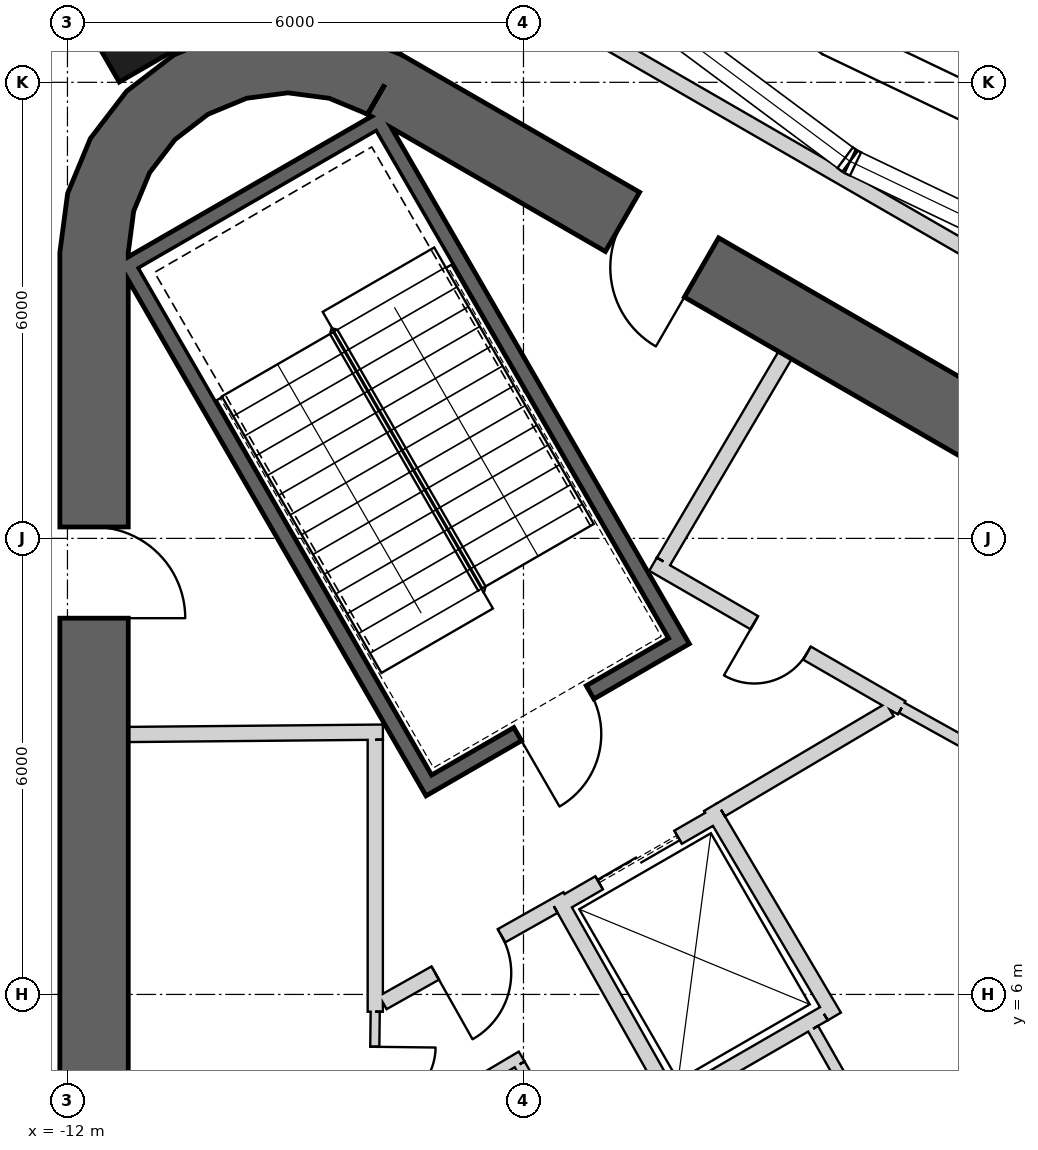
"""IFC4 building model, lengths in metres.
Left out: names, types, materials, properties, quantities, classifications, styles, units other than length and angle.
Written with IfcOpenShell. Run it as: python <this file> out.ifc"""

import sys

from ifc_helpers import new_model, si_unit, direction, frame, frame_2d, origin, origin_2d, place, context, subcontext, project, spatial, polyline, rectangle, outline, extrude, element, fill, save


model = new_model("IFC4")
c1 = context("Model", 3, precision=1e-05, world=origin(), true_north=direction((0.0, 1.0)))
c2 = subcontext(c1, "Body", "Model", "MODEL_VIEW")
j1 = project(units=[si_unit("LENGTHUNIT", "METRE"), si_unit("PLANEANGLEUNIT", "RADIAN")], contexts=[c1])
p1 = place(None, origin())
s1 = spatial("IfcSite", under=j1, at=p1, CompositionType="ELEMENT")
p2 = place(p1, origin())
s2 = spatial("IfcBuilding", under=s1, at=p2, CompositionType="ELEMENT")
p3 = place(p2, frame((0.0, 0.0, 435.3)))
s3 = spatial("IfcBuildingStorey", under=s2, at=p3, CompositionType="ELEMENT", Elevation=435.3)
p4 = place(p3, frame((-11.025, 19.097, 0.0), z_axis=(0.0, 0.0, 1.0), x_axis=(-0.5, 0.866025403784, 0.0)))
e1 = element("IfcColumn", 1, at=p4, inside=s3, PredefinedType="COLUMN", context=c2, shape_type="SweptSolid", body=[
    extrude(rectangle(XDim=1.6, YDim=1.6, at=origin_2d()), origin(), (0.0, 0.0, 1.0), 5.0),
])
p5 = place(p3, frame((19.475, 2.208, 0.0), z_axis=(0.0, 0.0, 1.0), x_axis=(-0.866028369851, 0.499994862586, 0.0)))
e2 = element("IfcWall", 2, at=p5, inside=s3, PredefinedType="SHEAR", context=c2, shape_type="SweptSolid", body=[
    extrude(rectangle(XDim=31.523, YDim=0.9, at=frame_2d((15.762, 0.0))), origin(), (0.0, 0.0, 1.0), 5.0),
])
p6 = place(p5, frame((3.612, 0.0, 0.0)))
e3 = element("IfcOpeningElement", 3, at=p6, cuts=e2, PredefinedType="OPENING", context=c2, shape_type="SweptSolid", body=[
    extrude(rectangle(XDim=1.2, YDim=2.4, at=frame_2d((0.6, 1.2))), frame((0.0, 0.46, 0.0), z_axis=(0.0, -1.0, 0.0), x_axis=(1.0, 0.0, 0.0)), (0.0, 0.0, 1.0), 0.92),
])
p7 = place(p5, frame((26.712, 0.0, 0.0)))
e4 = element("IfcOpeningElement", 4, at=p7, cuts=e2, PredefinedType="OPENING", context=c2, shape_type="SweptSolid", body=[
    extrude(rectangle(XDim=1.2, YDim=2.4, at=frame_2d((0.6, 1.2))), frame((0.0, 0.46, 0.0), z_axis=(0.0, -1.0, 0.0), x_axis=(1.0, 0.0, 0.0)), (0.0, 0.0, 1.0), 0.92),
])
p8 = place(p3, frame((-11.65, 15.762, 0.0), z_axis=(0.0, 0.0, 1.0), x_axis=(0.0, -1.0, 0.0)))
e5 = element("IfcWall", 5, at=p8, inside=s3, PredefinedType="SHEAR", context=c2, shape_type="SweptSolid", body=[
    extrude(rectangle(XDim=31.523, YDim=0.9, at=frame_2d((15.762, 0.0))), origin(), (0.0, 0.0, 1.0), 5.0),
])
p9 = place(p8, frame((3.612, 0.0, 0.0)))
e6 = element("IfcOpeningElement", 6, at=p9, cuts=e5, PredefinedType="OPENING", context=c2, shape_type="SweptSolid", body=[
    extrude(rectangle(XDim=1.2, YDim=2.4, at=frame_2d((0.6, 1.2))), frame((0.0, 0.46, 0.0), z_axis=(0.0, -1.0, 0.0), x_axis=(1.0, 0.0, 0.0)), (0.0, 0.0, 1.0), 0.92),
])
p10 = place(p8, frame((26.712, 0.0, 0.0)))
e7 = element("IfcOpeningElement", 7, at=p10, cuts=e5, PredefinedType="OPENING", context=c2, shape_type="SweptSolid", body=[
    extrude(rectangle(XDim=1.2, YDim=2.4, at=frame_2d((0.6, 1.2))), frame((0.0, 0.46, 0.0), z_axis=(0.0, -1.0, 0.0), x_axis=(1.0, 0.0, 0.0)), (0.0, 0.0, 1.0), 0.92),
])
p11 = place(p3, origin())
e8 = element("IfcWall", 8, at=p11, inside=s3, PredefinedType="SHEAR", context=c2, shape_type="SweptSolid", body=[
    extrude(outline(polyline([(-7.6, 18.36), (-8.323, 18.659), (-9.1, 18.762), (-9.876, 18.659), (-10.6, 18.36), (-11.221, 17.883), (-11.698, 17.262), (-11.998, 16.538), (-12.1, 15.762), (-11.2, 15.762), (-11.128, 16.305), (-10.919, 16.812), (-10.585, 17.247), (-10.15, 17.58), (-9.644, 17.79), (-9.1, 17.862), (-8.556, 17.79), (-8.05, 17.58), (-7.6, 18.36)])), origin(), (0.0, 0.0, 1.0), 5.0),
])
p12 = place(p3, frame((-11.245, 15.678, -0.25), z_axis=(0.0, 0.0, 1.0), x_axis=(0.499977274689, -0.866038523851, 0.0)))
e9 = element("IfcWall", 9, at=p12, inside=s3, PredefinedType="SHEAR", context=c2, shape_type="SweptSolid", body=[
    extrude(rectangle(XDim=8.1, YDim=0.2, at=frame_2d((4.05, 0.0))), origin(), (0.0, 0.0, 1.0), 5.0),
])
p13 = place(p3, frame((-7.818, 17.541, -0.25), z_axis=(0.0, 0.0, 1.0), x_axis=(-0.866044365799, -0.499967155389, 0.0)))
e10 = element("IfcWall", 10, at=p13, inside=s3, PredefinedType="SHEAR", context=c2, shape_type="SweptSolid", body=[
    extrude(rectangle(XDim=3.8, YDim=0.2, at=frame_2d((1.9, 0.0))), origin(), (0.0, 0.0, 1.0), 5.0),
])
p14 = place(p3, frame((-7.854, 17.405, -0.25), z_axis=(0.0, 0.0, 1.0), x_axis=(0.499997992926, -0.866026562566, 0.0)))
e11 = element("IfcWall", 11, at=p14, inside=s3, PredefinedType="SHEAR", context=c2, shape_type="SweptSolid", body=[
    extrude(rectangle(XDim=7.9, YDim=0.2, at=frame_2d((3.95, 0.0))), origin(), (0.0, 0.0, 1.0), 5.0),
])
p15 = place(p3, frame((-7.159, 8.8, -0.25), z_axis=(0.0, 0.0, 1.0), x_axis=(0.866047807691, 0.499961193289, 0.0)))
e12 = element("IfcWall", 12, at=p15, inside=s3, PredefinedType="SHEAR", context=c2, shape_type="SweptSolid", body=[
    extrude(rectangle(XDim=3.6, YDim=0.2, at=frame_2d((1.8, 0.0))), origin(), (0.0, 0.0, 1.0), 5.0),
])
p16 = place(p15, frame((1.25, 0.0, 0.25)))
e13 = element("IfcOpeningElement", 13, at=p16, cuts=e12, PredefinedType="OPENING", context=c2, shape_type="SweptSolid", body=[
    extrude(rectangle(XDim=1.1, YDim=2.1, at=frame_2d((0.55, 1.05))), frame((0.0, 0.11, 0.0), z_axis=(0.0, -1.0, 0.0), x_axis=(1.0, 0.0, 0.0)), (0.0, 0.0, 1.0), 0.22),
])
p17 = place(p3, frame((-5.524, 7.168, 0.0), z_axis=(0.0, 0.0, 1.0), x_axis=(0.866024647952, 0.500001309137, 0.0)))
e14 = element("IfcWall", 14, at=p17, inside=s3, PredefinedType="PLUMBINGWALL", context=c2, shape_type="SweptSolid", body=[
    extrude(rectangle(XDim=2.4, YDim=0.2, at=frame_2d((1.2, 0.0))), origin(), (0.0, 0.0, 1.0), 4.75),
])
p18 = place(p17, frame((0.6, 0.0, 0.0)))
e15 = element("IfcOpeningElement", 15, at=p18, cuts=e14, PredefinedType="OPENING", context=c2, shape_type="SweptSolid", body=[
    extrude(rectangle(XDim=1.2, YDim=2.4, at=frame_2d((0.6, 1.2))), frame((0.0, 0.11, 0.0), z_axis=(0.0, -1.0, 0.0), x_axis=(1.0, 0.0, 0.0)), (0.0, 0.0, 1.0), 0.22),
])
p19 = place(p3, frame((-3.538, 8.465, 0.0), z_axis=(0.0, 0.0, 1.0), x_axis=(0.508616218331, -0.860993346345, 0.0)))
e16 = element("IfcWall", 16, at=p19, inside=s3, PredefinedType="PLUMBINGWALL", context=c2, shape_type="SweptSolid", body=[
    extrude(rectangle(XDim=3.2, YDim=0.2, at=frame_2d((1.6, 0.0))), origin(), (0.0, 0.0, 1.0), 4.75),
])
p20 = place(p3, frame((-2.047, 5.746, 0.0), z_axis=(0.0, 0.0, 1.0), x_axis=(-0.866024647952, -0.500001309137, 0.0)))
e17 = element("IfcWall", 17, at=p20, inside=s3, PredefinedType="PLUMBINGWALL", context=c2, shape_type="SweptSolid", body=[
    extrude(rectangle(XDim=2.4, YDim=0.2, at=frame_2d((1.2, 0.0))), origin(), (0.0, 0.0, 1.0), 4.75),
])
p21 = place(p3, frame((-5.562, 7.296, 0.0), z_axis=(0.0, 0.0, 1.0), x_axis=(0.49134651263, -0.870964180966, 0.0)))
e18 = element("IfcWall", 18, at=p21, inside=s3, PredefinedType="PLUMBINGWALL", context=c2, shape_type="SweptSolid", body=[
    extrude(rectangle(XDim=3.0, YDim=0.2, at=frame_2d((1.5, 0.0))), origin(), (0.0, 0.0, 1.0), 4.75),
])
p22 = place(p3, frame((-7.85, 9.451, 0.0), z_axis=(0.0, 0.0, 1.0), x_axis=(-0.999957167047, -0.009255488683, 0.0)))
e19 = element("IfcWall", 19, at=p22, inside=s3, PredefinedType="PARTITIONING", context=c2, shape_type="SweptSolid", body=[
    extrude(rectangle(XDim=3.35, YDim=0.2, at=frame_2d((1.675, 0.0))), origin(), (0.0, 0.0, 1.0), 4.75),
])
p23 = place(p3, frame((-7.95, 5.772, 0.0), z_axis=(0.0, 0.0, 1.0), x_axis=(0.0, 1.0, 0.0)))
e20 = element("IfcWall", 20, at=p23, inside=s3, PredefinedType="PARTITIONING", context=c2, shape_type="SweptSolid", body=[
    extrude(rectangle(XDim=3.578, YDim=0.2, at=frame_2d((1.789, 0.0))), origin(), (0.0, 0.0, 1.0), 4.75),
])
p24 = place(p3, frame((-7.971, 4.05, 0.0), z_axis=(0.0, 0.0, 1.0), x_axis=(0.012047318415, 0.999927428426, 0.0)))
e21 = element("IfcWall", 21, at=p24, inside=s3, PredefinedType="PARTITIONING", context=c2, shape_type="SweptSolid", body=[
    extrude(rectangle(XDim=1.723, YDim=0.12, at=frame_2d((0.861, 0.0))), origin(), (0.0, 0.0, 1.0), 4.75),
])
p25 = place(p24, frame((0.461, 0.0, 0.0)))
e22 = element("IfcOpeningElement", 22, at=p25, cuts=e21, PredefinedType="OPENING", context=c2, shape_type="SweptSolid", body=[
    extrude(rectangle(XDim=0.8, YDim=2.1, at=frame_2d((0.4, 1.05))), frame((0.0, 0.07, 0.0), z_axis=(0.0, -1.0, 0.0), x_axis=(1.0, 0.0, 0.0)), (0.0, 0.0, 1.0), 0.14),
])
p26 = place(p3, frame((-4.296, 11.66, 0.0), z_axis=(0.0, 0.0, 1.0), x_axis=(0.866027389382, -0.499996560828, 0.0)))
e23 = element("IfcWall", 23, at=p26, inside=s3, PredefinedType="PARTITIONING", context=c2, shape_type="SweptSolid", body=[
    extrude(rectangle(XDim=3.778, YDim=0.2, at=frame_2d((1.889, 0.0))), origin(), (0.0, 0.0, 1.0), 4.75),
])
p27 = place(p26, frame((1.539, 0.0, 0.0)))
e24 = element("IfcOpeningElement", 24, at=p27, cuts=e23, PredefinedType="OPENING", context=c2, shape_type="SweptSolid", body=[
    extrude(rectangle(XDim=0.8, YDim=2.1, at=frame_2d((0.4, 1.05))), frame((0.0, 0.11, 0.0), z_axis=(0.0, -1.0, 0.0), x_axis=(1.0, 0.0, 0.0)), (0.0, 0.0, 1.0), 0.22),
])
p28 = place(p3, frame((-2.558, 14.409, 0.0), z_axis=(0.0, 0.0, 1.0), x_axis=(-0.508018930956, -0.861345903683, 0.0)))
e25 = element("IfcWall", 25, at=p28, inside=s3, PredefinedType="PARTITIONING", context=c2, shape_type="SweptSolid", body=[
    extrude(rectangle(XDim=3.15, YDim=0.2, at=frame_2d((1.575, 0.0))), origin(), (0.0, 0.0, 1.0), 4.75),
])
p29 = place(p3, frame((0.483, 8.936, 0.0), z_axis=(0.0, 0.0, 1.0), x_axis=(-0.874290944206, 0.485402250592, 0.0)))
e26 = element("IfcWall", 26, at=p29, inside=s3, PredefinedType="PLUMBINGWALL", context=c2, shape_type="SweptSolid", body=[
    extrude(rectangle(XDim=1.723, YDim=0.15, at=frame_2d((0.861, 0.0))), origin(), (0.0, 0.0, 1.0), 4.75),
])
p30 = place(p3, frame((-1.179, 9.745, 0.0), z_axis=(0.0, 0.0, 1.0), x_axis=(-0.860630814782, -0.509229418482, 0.0)))
e27 = element("IfcWall", 27, at=p30, inside=s3, PredefinedType="PARTITIONING", context=c2, shape_type="SweptSolid", body=[
    extrude(rectangle(XDim=2.582, YDim=0.2, at=frame_2d((1.291, 0.0))), origin(), (0.0, 0.0, 1.0), 4.75),
])
p31 = place(p3, frame((-5.6, 7.16, 0.0), z_axis=(0.0, 0.0, 1.0), x_axis=(-0.871350695252, -0.490660744185, 0.0)))
e28 = element("IfcWall", 28, at=p31, inside=s3, PredefinedType="PARTITIONING", context=c2, shape_type="SweptSolid", body=[
    extrude(rectangle(XDim=2.582, YDim=0.2, at=frame_2d((1.291, 0.0))), origin(), (0.0, 0.0, 1.0), 4.75),
])
p32 = place(p31, frame((0.791, 0.0, 0.0)))
e29 = element("IfcOpeningElement", 29, at=p32, cuts=e28, PredefinedType="OPENING", context=c2, shape_type="SweptSolid", body=[
    extrude(rectangle(XDim=1.0, YDim=2.1, at=frame_2d((0.5, 1.05))), frame((0.0, 0.11, 0.0), z_axis=(0.0, -1.0, 0.0), x_axis=(1.0, 0.0, 0.0)), (0.0, 0.0, 1.0), 0.22),
])
p33 = place(p3, frame((-2.189, 5.549, 0.0), z_axis=(0.0, 0.0, 1.0), x_axis=(0.494335077001, -0.869271437266, 0.0)))
e30 = element("IfcWall", 30, at=p33, inside=s3, PredefinedType="PLUMBINGWALL", context=c2, shape_type="SweptSolid", body=[
    extrude(rectangle(XDim=4.404, YDim=0.15, at=frame_2d((2.202, 0.0))), origin(), (0.0, 0.0, 1.0), 4.75),
])
p34 = place(p3, frame((-6.024, 5.183, 0.0), z_axis=(0.0, 0.0, 1.0), x_axis=(-0.860126804455, -0.510080268447, 0.0)))
e31 = element("IfcWall", 31, at=p34, inside=s3, PredefinedType="PLUMBINGWALL", context=c2, shape_type="SweptSolid", body=[
    extrude(rectangle(XDim=2.24, YDim=0.15, at=frame_2d((1.12, 0.0))), origin(), (0.0, 0.0, 1.0), 4.75),
])
p35 = place(p3, frame((-4.551, 2.482, 0.0), z_axis=(0.0, 0.0, 1.0), x_axis=(-0.499990139034, 0.866031096941, 0.0)))
e32 = element("IfcWall", 32, at=p35, inside=s3, PredefinedType="PLUMBINGWALL", context=c2, shape_type="SweptSolid", body=[
    extrude(rectangle(XDim=3.0, YDim=0.15, at=frame_2d((1.5, 0.0))), origin(), (0.0, 0.0, 1.0), 4.75),
])
p36 = place(p35, frame((1.137, 0.0, 0.0)))
e33 = element("IfcOpeningElement", 33, at=p36, cuts=e32, PredefinedType="OPENING", context=c2, shape_type="SweptSolid", body=[
    extrude(rectangle(XDim=0.8, YDim=2.1, at=frame_2d((0.4, 1.05))), frame((0.0, 0.085, 0.0), z_axis=(0.0, -1.0, 0.0), x_axis=(1.0, 0.0, 0.0)), (0.0, 0.0, 1.0), 0.17),
])
p37 = place(p3, frame((20.834, 3.675, 0.0), z_axis=(0.0, 0.0, 1.0), x_axis=(-0.866028536494, 0.499994573949, 0.0)))
e34 = element("IfcWall", 34, at=p37, inside=s3, PredefinedType="PARTITIONING", context=c2, shape_type="SweptSolid", body=[
    extrude(rectangle(XDim=32.411, YDim=0.2, at=frame_2d((16.206, 0.0))), origin(), (0.0, 0.0, 1.0), 4.75),
])
p38 = place(p37, frame((7.7, 0.0, 0.0)))
e35 = element("IfcOpeningElement", 35, at=p38, cuts=e34, PredefinedType="OPENING", context=c2, shape_type="SweptSolid", body=[
    extrude(rectangle(XDim=1.0, YDim=2.1, at=frame_2d((0.5, 1.05))), frame((0.0, 0.11, 0.0), z_axis=(0.0, -1.0, 0.0), x_axis=(1.0, 0.0, 0.0)), (0.0, 0.0, 1.0), 0.22),
])
p39 = place(p37, frame((18.006, 0.0, 0.0)))
e36 = element("IfcOpeningElement", 36, at=p39, cuts=e34, PredefinedType="OPENING", context=c2, shape_type="SweptSolid", body=[
    extrude(rectangle(XDim=1.0, YDim=2.1, at=frame_2d((0.5, 1.05))), frame((0.0, 0.11, 0.0), z_axis=(0.0, -1.0, 0.0), x_axis=(1.0, 0.0, 0.0)), (0.0, 0.0, 1.0), 0.22),
])
p40 = place(p16, origin())
e37 = element("IfcDoor", 37, at=p40, inside=s3, OperationType="SINGLE_SWING_LEFT", PredefinedType="USERDEFINED", context=c2, shape_type="SweptSolid", body=[
    extrude(rectangle(XDim=1.1, YDim=2.1, at=frame_2d((0.55, 1.05))), frame((0.0, 0.025, 0.0), z_axis=(0.0, -1.0, 0.0), x_axis=(1.0, 0.0, 0.0)), (0.0, 0.0, 1.0), 0.05),
])
fill(e13, e37)
p41 = place(p32, origin())
e38 = element("IfcDoor", 38, at=p41, inside=s3, OperationType="SINGLE_SWING_RIGHT", PredefinedType="USERDEFINED", context=c2, shape_type="SweptSolid", body=[
    extrude(rectangle(XDim=1.0, YDim=2.1, at=frame_2d((0.5, 1.05))), frame((0.0, 0.025, 0.0), z_axis=(0.0, -1.0, 0.0), x_axis=(1.0, 0.0, 0.0)), (0.0, 0.0, 1.0), 0.05),
])
fill(e29, e38)
p42 = place(p18, origin())
e39 = element("IfcDoor", 39, at=p42, inside=s3, OperationType="SLIDING_TO_LEFT", PredefinedType="USERDEFINED", context=c2, shape_type="SweptSolid", body=[
    extrude(rectangle(XDim=1.2, YDim=2.4, at=frame_2d((0.6, 1.2))), frame((0.0, 0.025, 0.0), z_axis=(0.0, -1.0, 0.0), x_axis=(1.0, 0.0, 0.0)), (0.0, 0.0, 1.0), 0.05),
])
fill(e15, e39)
p43 = place(p25, origin())
e40 = element("IfcDoor", 40, at=p43, inside=s3, OperationType="SINGLE_SWING_RIGHT", PredefinedType="USERDEFINED", context=c2, shape_type="SweptSolid", body=[
    extrude(rectangle(XDim=0.8, YDim=2.1, at=frame_2d((0.4, 1.05))), frame((0.0, 0.025, 0.0), z_axis=(0.0, -1.0, 0.0), x_axis=(1.0, 0.0, 0.0)), (0.0, 0.0, 1.0), 0.05),
])
fill(e22, e40)
p44 = place(p27, origin())
e41 = element("IfcDoor", 41, at=p44, inside=s3, OperationType="SINGLE_SWING_LEFT", PredefinedType="USERDEFINED", context=c2, shape_type="SweptSolid", body=[
    extrude(rectangle(XDim=0.8, YDim=2.1, at=frame_2d((0.4, 1.05))), frame((0.0, 0.025, 0.0), z_axis=(0.0, -1.0, 0.0), x_axis=(1.0, 0.0, 0.0)), (0.0, 0.0, 1.0), 0.05),
])
fill(e24, e41)
p45 = place(p7, origin())
e42 = element("IfcDoor", 42, at=p45, inside=s3, OperationType="SINGLE_SWING_LEFT", PredefinedType="USERDEFINED", context=c2, shape_type="SweptSolid", body=[
    extrude(rectangle(XDim=1.2, YDim=2.4, at=frame_2d((0.6, 1.2))), frame((0.0, 0.025, 0.0), z_axis=(0.0, -1.0, 0.0), x_axis=(1.0, 0.0, 0.0)), (0.0, 0.0, 1.0), 0.05),
])
fill(e4, e42)
p46 = place(p9, origin())
e43 = element("IfcDoor", 43, at=p46, inside=s3, OperationType="SINGLE_SWING_RIGHT", PredefinedType="USERDEFINED", context=c2, shape_type="SweptSolid", body=[
    extrude(rectangle(XDim=1.2, YDim=2.4, at=frame_2d((0.6, 1.2))), frame((0.0, 0.025, 0.0), z_axis=(0.0, -1.0, 0.0), x_axis=(1.0, 0.0, 0.0)), (0.0, 0.0, 1.0), 0.05),
])
fill(e6, e43)
save(model, sys.argv[1])
